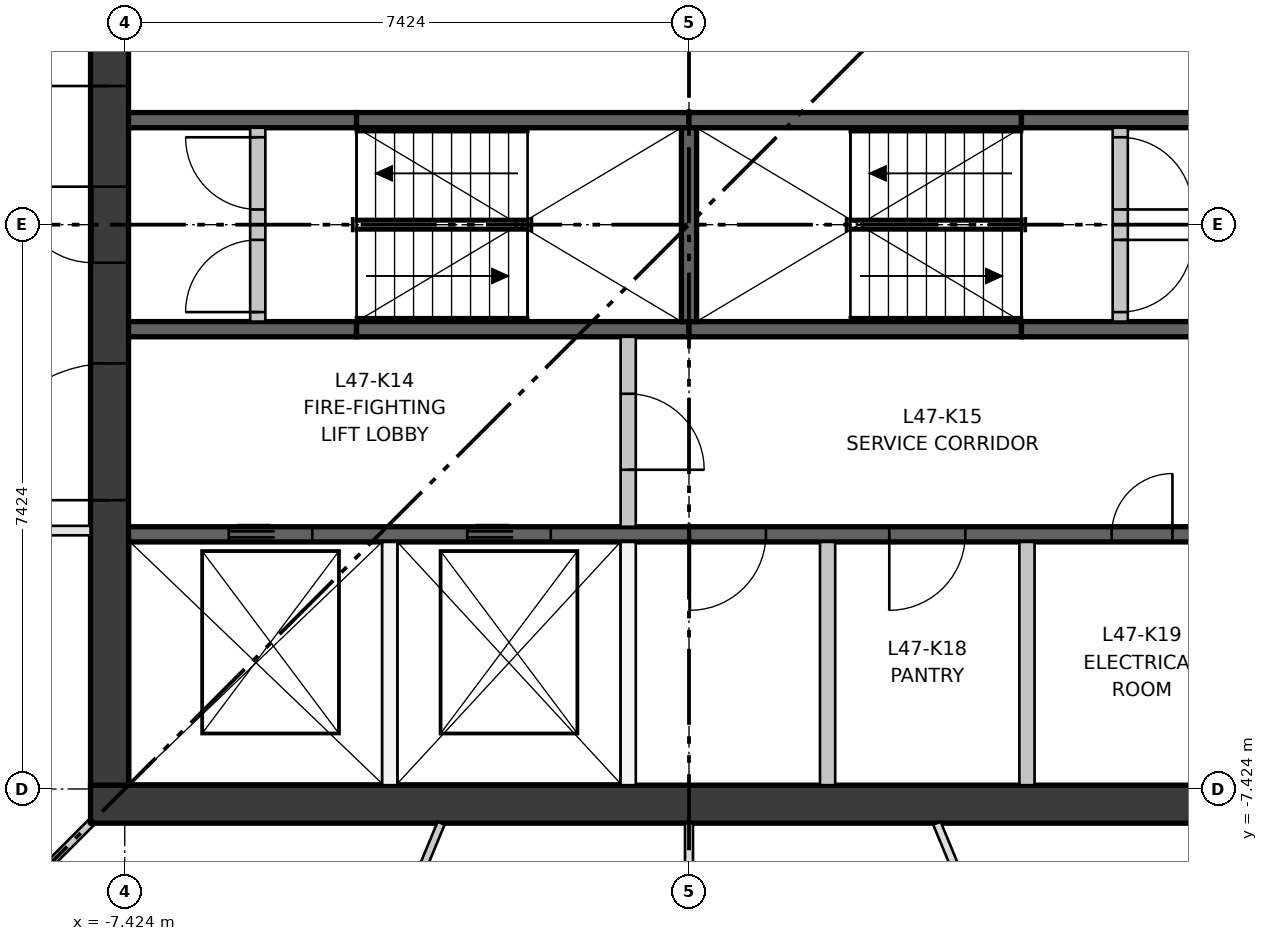
"""IFC4 building model, lengths in metres.
Left out: names, types, materials, properties, quantities, classifications, styles, units other than length and angle.
Written with IfcOpenShell. Run it as: python <this file> out.ifc"""

import sys

from ifc_helpers import new_model, si_unit, direction, frame, frame_2d, origin, place, context, subcontext, project, spatial, rectangle, extrude, element, fill, save


model = new_model("IFC4")
c1 = context("Model", 3, precision=1e-05, world=origin(), true_north=direction((0.0, 1.0)))
c2 = subcontext(c1, "Body", "Model", "MODEL_VIEW")
j1 = project(units=[si_unit("LENGTHUNIT", "METRE"), si_unit("PLANEANGLEUNIT", "RADIAN")], contexts=[c1])
p1 = place(None, origin())
s1 = spatial("IfcSite", under=j1, at=p1, CompositionType="ELEMENT")
p2 = place(p1, origin())
s2 = spatial("IfcBuilding", under=s1, at=p2, CompositionType="ELEMENT")
p3 = place(p2, frame((0.0, 0.0, 177.6)))
s3 = spatial("IfcBuildingStorey", under=s2, at=p3, CompositionType="ELEMENT", Elevation=177.6)
p4 = place(p3, frame((-7.874, -7.624, 0.0), z_axis=(0.0, 0.0, 1.0), x_axis=(1.0, 0.0, 0.0)))
e1 = element("IfcWall", 1, at=p4, inside=s3, PredefinedType="SHEAR", context=c2, shape_type="SweptSolid", body=[
    extrude(rectangle(XDim=15.748, YDim=0.5, at=frame_2d((7.874, 0.0))), origin(), (0.0, 0.0, 1.0), 3.35),
])
p5 = place(p3, frame((-7.624, -7.374, 0.0), z_axis=(0.0, 0.0, 1.0), x_axis=(0.0, 1.0, 0.0)))
e2 = element("IfcWall", 2, at=p5, inside=s3, PredefinedType="SHEAR", context=c2, shape_type="SweptSolid", body=[
    extrude(rectangle(XDim=14.748, YDim=0.5, at=frame_2d((7.374, 0.0))), origin(), (0.0, 0.0, 1.0), 3.35),
])
p6 = place(p5, frame((6.874, 0.0, 0.0)))
e3 = element("IfcOpeningElement", 3, at=p6, cuts=e2, PredefinedType="OPENING", context=c2, shape_type="SweptSolid", body=[
    extrude(rectangle(XDim=1.0, YDim=2.1, at=frame_2d((0.5, 1.05))), frame((0.0, 0.26, 0.0), z_axis=(0.0, -1.0, 0.0), x_axis=(1.0, 0.0, 0.0)), (0.0, 0.0, 1.0), 0.52),
])
p7 = place(p5, frame((3.75, 0.0, 0.0)))
e4 = element("IfcOpeningElement", 4, at=p7, cuts=e2, PredefinedType="OPENING", context=c2, shape_type="SweptSolid", body=[
    extrude(rectangle(XDim=1.8, YDim=2.1, at=frame_2d((0.9, 1.05))), frame((0.0, 0.26, 0.0), z_axis=(0.0, -1.0, 0.0), x_axis=(1.0, 0.0, 0.0)), (0.0, 0.0, 1.0), 0.52),
])
p8 = place(p5, frame((9.198, 0.0, 0.0)))
e5 = element("IfcOpeningElement", 5, at=p8, cuts=e2, PredefinedType="OPENING", context=c2, shape_type="SweptSolid", body=[
    extrude(rectangle(XDim=1.8, YDim=2.1, at=frame_2d((0.9, 1.05))), frame((0.0, 0.26, 0.0), z_axis=(0.0, -1.0, 0.0), x_axis=(1.0, 0.0, 0.0)), (0.0, 0.0, 1.0), 0.52),
])
p9 = place(p3, frame((-7.374, -4.074, 0.0), z_axis=(0.0, 0.0, 1.0), x_axis=(1.0, 0.0, 0.0)))
e6 = element("IfcWall", 6, at=p9, inside=s3, PredefinedType="SHEAR", context=c2, shape_type="SweptSolid", body=[
    extrude(rectangle(XDim=14.748, YDim=0.2, at=frame_2d((7.374, 0.0))), origin(), (0.0, 0.0, 1.0), 3.0),
])
p10 = place(p9, frame((1.319, 0.0, 0.0)))
e7 = element("IfcOpeningElement", 7, at=p10, cuts=e6, PredefinedType="OPENING", context=c2, shape_type="SweptSolid", body=[
    extrude(rectangle(XDim=1.1, YDim=2.1, at=frame_2d((0.55, 1.05))), frame((0.0, 0.11, 0.0), z_axis=(0.0, -1.0, 0.0), x_axis=(1.0, 0.0, 0.0)), (0.0, 0.0, 1.0), 0.22),
])
p11 = place(p9, frame((4.456, 0.0, 0.0)))
e8 = element("IfcOpeningElement", 8, at=p11, cuts=e6, PredefinedType="OPENING", context=c2, shape_type="SweptSolid", body=[
    extrude(rectangle(XDim=1.1, YDim=2.1, at=frame_2d((0.55, 1.05))), frame((0.0, 0.11, 0.0), z_axis=(0.0, -1.0, 0.0), x_axis=(1.0, 0.0, 0.0)), (0.0, 0.0, 1.0), 0.22),
])
p12 = place(p9, frame((7.386, 0.0, 0.0)))
e9 = element("IfcOpeningElement", 9, at=p12, cuts=e6, PredefinedType="OPENING", context=c2, shape_type="SweptSolid", body=[
    extrude(rectangle(XDim=1.0, YDim=2.1, at=frame_2d((0.5, 1.05))), frame((0.0, 0.11, 0.0), z_axis=(0.0, -1.0, 0.0), x_axis=(1.0, 0.0, 0.0)), (0.0, 0.0, 1.0), 0.22),
])
p13 = place(p9, frame((10.009, 0.0, 0.0)))
e10 = element("IfcOpeningElement", 10, at=p13, cuts=e6, PredefinedType="OPENING", context=c2, shape_type="SweptSolid", body=[
    extrude(rectangle(XDim=1.0, YDim=2.1, at=frame_2d((0.5, 1.05))), frame((0.0, 0.11, 0.0), z_axis=(0.0, -1.0, 0.0), x_axis=(1.0, 0.0, 0.0)), (0.0, 0.0, 1.0), 0.22),
])
p14 = place(p9, frame((12.934, 0.0, 0.0)))
e11 = element("IfcOpeningElement", 11, at=p14, cuts=e6, PredefinedType="OPENING", context=c2, shape_type="SweptSolid", body=[
    extrude(rectangle(XDim=0.8, YDim=2.1, at=frame_2d((0.4, 1.05))), frame((0.0, 0.11, 0.0), z_axis=(0.0, -1.0, 0.0), x_axis=(1.0, 0.0, 0.0)), (0.0, 0.0, 1.0), 0.22),
])
p15 = place(p3, frame((-7.374, -1.375, 0.0), z_axis=(0.0, 0.0, 1.0), x_axis=(1.0, 0.0, 0.0)))
e12 = element("IfcWall", 12, at=p15, inside=s3, PredefinedType="SHEAR", context=c2, shape_type="SweptSolid", body=[
    extrude(rectangle(XDim=3.0, YDim=0.2, at=frame_2d((1.5, 0.0))), origin(), (0.0, 0.0, 1.0), 3.0),
])
for number, where, z_axis, x_axis in (
    (13, (-4.374, -1.375, 0.0), (0.0, 0.0, 1.0), (1.0, 0.0, 0.0)),
    (14, (0.0, -1.375, 0.0), (0.0, 0.0, 1.0), (1.0, 0.0, 0.0)),
):
    element("IfcWall", number, at=place(p3, frame(where, z_axis=z_axis, x_axis=x_axis)), inside=s3, PredefinedType="SHEAR", context=c2, shape_type="SweptSolid", body=[
        extrude(rectangle(XDim=4.374, YDim=0.2, at=frame_2d((2.187, 0.0))), origin(), (0.0, 0.0, 1.0), 3.0),
    ])
for number, where, z_axis, x_axis in (
    (15, (4.374, -1.375, 0.0), (0.0, 0.0, 1.0), (1.0, 0.0, 0.0)),
    (16, (-7.374, 1.375, 0.0), (0.0, 0.0, 1.0), (1.0, 0.0, 0.0)),
):
    element("IfcWall", number, at=place(p3, frame(where, z_axis=z_axis, x_axis=x_axis)), inside=s3, PredefinedType="SHEAR", context=c2, shape_type="SweptSolid", body=[
        extrude(rectangle(XDim=3.0, YDim=0.2, at=frame_2d((1.5, 0.0))), origin(), (0.0, 0.0, 1.0), 3.0),
    ])
for number, where, z_axis, x_axis in (
    (17, (-4.374, 1.375, 0.0), (0.0, 0.0, 1.0), (1.0, 0.0, 0.0)),
    (18, (0.0, 1.375, 0.0), (0.0, 0.0, 1.0), (1.0, 0.0, 0.0)),
):
    element("IfcWall", number, at=place(p3, frame(where, z_axis=z_axis, x_axis=x_axis)), inside=s3, PredefinedType="SHEAR", context=c2, shape_type="SweptSolid", body=[
        extrude(rectangle(XDim=4.374, YDim=0.2, at=frame_2d((2.187, 0.0))), origin(), (0.0, 0.0, 1.0), 3.0),
    ])
p16 = place(p3, frame((4.374, 1.375, 0.0), z_axis=(0.0, 0.0, 1.0), x_axis=(1.0, 0.0, 0.0)))
e19 = element("IfcWall", 19, at=p16, inside=s3, PredefinedType="SHEAR", context=c2, shape_type="SweptSolid", body=[
    extrude(rectangle(XDim=3.0, YDim=0.2, at=frame_2d((1.5, 0.0))), origin(), (0.0, 0.0, 1.0), 3.0),
])
p17 = place(p3, frame((0.0, -1.275, 0.0), z_axis=(0.0, 0.0, 1.0), x_axis=(0.0, 1.0, 0.0)))
e20 = element("IfcWall", 20, at=p17, inside=s3, PredefinedType="SHEAR", context=c2, shape_type="SweptSolid", body=[
    extrude(rectangle(XDim=2.55, YDim=0.2, at=frame_2d((1.275, 0.0))), origin(), (0.0, 0.0, 1.0), 3.0),
])
for number, where, z_axis, x_axis in (
    (21, (-3.937, -7.374, 0.0), (0.0, 0.0, 1.0), (0.0, 1.0, 0.0)),
    (22, (-0.8, -7.374, 0.0), (0.0, 0.0, 1.0), (0.0, 1.0, 0.0)),
):
    element("IfcWall", number, at=place(p3, frame(where, z_axis=z_axis, x_axis=x_axis)), inside=s3, PredefinedType="PARTITIONING", context=c2, shape_type="SweptSolid", body=[
        extrude(rectangle(XDim=3.2, YDim=0.2, at=frame_2d((1.6, 0.0))), origin(), (0.0, 0.0, 1.0), 3.0),
    ])
p18 = place(p3, frame((-0.8, -3.974, 0.0), z_axis=(0.0, 0.0, 1.0), x_axis=(0.0, 1.0, 0.0)))
e23 = element("IfcWall", 23, at=p18, inside=s3, PredefinedType="PARTITIONING", context=c2, shape_type="SweptSolid", body=[
    extrude(rectangle(XDim=2.499, YDim=0.2, at=frame_2d((1.25, 0.0))), origin(), (0.0, 0.0, 1.0), 3.0),
])
p19 = place(p18, frame((0.75, 0.0, 0.0)))
e24 = element("IfcOpeningElement", 24, at=p19, cuts=e23, PredefinedType="OPENING", context=c2, shape_type="SweptSolid", body=[
    extrude(rectangle(XDim=1.0, YDim=2.1, at=frame_2d((0.5, 1.05))), frame((0.0, 0.11, 0.0), z_axis=(0.0, -1.0, 0.0), x_axis=(1.0, 0.0, 0.0)), (0.0, 0.0, 1.0), 0.22),
])
for number, where, z_axis, x_axis in (
    (25, (1.823, -7.374, 0.0), (0.0, 0.0, 1.0), (0.0, 1.0, 0.0)),
    (26, (4.447, -7.374, 0.0), (0.0, 0.0, 1.0), (0.0, 1.0, 0.0)),
):
    element("IfcWall", number, at=place(p3, frame(where, z_axis=z_axis, x_axis=x_axis)), inside=s3, PredefinedType="PARTITIONING", context=c2, shape_type="SweptSolid", body=[
        extrude(rectangle(XDim=3.2, YDim=0.2, at=frame_2d((1.6, 0.0))), origin(), (0.0, 0.0, 1.0), 3.0),
    ])
p20 = place(p3, frame((-5.674, -1.275, 0.0), z_axis=(0.0, 0.0, 1.0), x_axis=(0.0, 1.0, 0.0)))
e27 = element("IfcWall", 27, at=p20, inside=s3, PredefinedType="PARTITIONING", context=c2, shape_type="SweptSolid", body=[
    extrude(rectangle(XDim=2.55, YDim=0.2, at=frame_2d((1.275, 0.0))), origin(), (0.0, 0.0, 1.0), 3.0),
])
p21 = place(p20, frame((0.125, 0.0, 0.0)))
e28 = element("IfcOpeningElement", 28, at=p21, cuts=e27, PredefinedType="OPENING", context=c2, shape_type="SweptSolid", body=[
    extrude(rectangle(XDim=0.95, YDim=2.1, at=frame_2d((0.475, 1.05))), frame((0.0, 0.11, 0.0), z_axis=(0.0, -1.0, 0.0), x_axis=(1.0, 0.0, 0.0)), (0.0, 0.0, 1.0), 0.22),
])
p22 = place(p20, frame((1.475, 0.0, 0.0)))
e29 = element("IfcOpeningElement", 29, at=p22, cuts=e27, PredefinedType="OPENING", context=c2, shape_type="SweptSolid", body=[
    extrude(rectangle(XDim=0.95, YDim=2.1, at=frame_2d((0.475, 1.05))), frame((0.0, 0.11, 0.0), z_axis=(0.0, -1.0, 0.0), x_axis=(1.0, 0.0, 0.0)), (0.0, 0.0, 1.0), 0.22),
])
p23 = place(p3, frame((5.674, -1.275, 0.0), z_axis=(0.0, 0.0, 1.0), x_axis=(0.0, 1.0, 0.0)))
e30 = element("IfcWall", 30, at=p23, inside=s3, PredefinedType="PARTITIONING", context=c2, shape_type="SweptSolid", body=[
    extrude(rectangle(XDim=2.55, YDim=0.2, at=frame_2d((1.275, 0.0))), origin(), (0.0, 0.0, 1.0), 3.0),
])
p24 = place(p23, frame((0.125, 0.0, 0.0)))
e31 = element("IfcOpeningElement", 31, at=p24, cuts=e30, PredefinedType="OPENING", context=c2, shape_type="SweptSolid", body=[
    extrude(rectangle(XDim=0.95, YDim=2.1, at=frame_2d((0.475, 1.05))), frame((0.0, 0.11, 0.0), z_axis=(0.0, -1.0, 0.0), x_axis=(1.0, 0.0, 0.0)), (0.0, 0.0, 1.0), 0.22),
])
p25 = place(p23, frame((1.475, 0.0, 0.0)))
e32 = element("IfcOpeningElement", 32, at=p25, cuts=e30, PredefinedType="OPENING", context=c2, shape_type="SweptSolid", body=[
    extrude(rectangle(XDim=0.95, YDim=2.1, at=frame_2d((0.475, 1.05))), frame((0.0, 0.11, 0.0), z_axis=(0.0, -1.0, 0.0), x_axis=(1.0, 0.0, 0.0)), (0.0, 0.0, 1.0), 0.22),
])
p26 = place(p3, frame((-7.874, -4.024, 0.0), z_axis=(0.0, 0.0, 1.0), x_axis=(-1.0, 0.0, 0.0)))
e33 = element("IfcWall", 33, at=p26, inside=s3, PredefinedType="PARTITIONING", context=c2, shape_type="SweptSolid", body=[
    extrude(rectangle(XDim=5.499, YDim=0.125, at=frame_2d((2.75, 0.0))), origin(), (0.0, 0.0, 1.0), 3.0),
])
p27 = place(p26, frame((2.2, 0.0, 0.0)))
e34 = element("IfcOpeningElement", 34, at=p27, cuts=e33, PredefinedType="OPENING", context=c2, shape_type="SweptSolid", body=[
    extrude(rectangle(XDim=1.0, YDim=2.1, at=frame_2d((0.5, 1.05))), frame((0.0, 0.073, 0.0), z_axis=(0.0, -1.0, 0.0), x_axis=(1.0, 0.0, 0.0)), (0.0, 0.0, 1.0), 0.145),
])
p28 = place(p3, frame((-7.874, -7.874, 0.0), z_axis=(0.0, 0.0, 1.0), x_axis=(-0.707106781187, -0.707106781187, 0.0)))
e35 = element("IfcWall", 35, at=p28, inside=s3, PredefinedType="PARTITIONING", context=c2, shape_type="SweptSolid", body=[
    extrude(rectangle(XDim=6.404, YDim=0.1, at=frame_2d((3.202, 0.0))), origin(), (0.0, 0.0, 1.0), 3.0),
])
p29 = place(p28, frame((2.4, 0.0, 0.0)))
e36 = element("IfcOpeningElement", 36, at=p29, cuts=e35, PredefinedType="OPENING", context=c2, shape_type="SweptSolid", body=[
    extrude(rectangle(XDim=1.0, YDim=2.1, at=frame_2d((0.5, 1.05))), frame((0.0, 0.06, 0.0), z_axis=(0.0, -1.0, 0.0), x_axis=(1.0, 0.0, 0.0)), (0.0, 0.0, 1.0), 0.12),
])
p30 = place(p3, frame((-3.261, -7.874, 0.0), z_axis=(0.0, 0.0, 1.0), x_axis=(-0.382669328176, -0.923885374532, 0.0)))
e37 = element("IfcWall", 37, at=p30, inside=s3, PredefinedType="PARTITIONING", context=c2, shape_type="SweptSolid", body=[
    extrude(rectangle(XDim=6.247, YDim=0.1, at=frame_2d((3.124, 0.0))), origin(), (0.0, 0.0, 1.0), 3.0),
])
p31 = place(p30, frame((2.6, 0.0, 0.0)))
e38 = element("IfcOpeningElement", 38, at=p31, cuts=e37, PredefinedType="OPENING", context=c2, shape_type="SweptSolid", body=[
    extrude(rectangle(XDim=1.0, YDim=2.1, at=frame_2d((0.5, 1.05))), frame((0.0, 0.06, 0.0), z_axis=(0.0, -1.0, 0.0), x_axis=(1.0, 0.0, 0.0)), (0.0, 0.0, 1.0), 0.12),
])
p32 = place(p3, frame((0.0, -7.874, 0.0), z_axis=(0.0, 0.0, 1.0), x_axis=(0.0, -1.0, 0.0)))
e39 = element("IfcWall", 39, at=p32, inside=s3, PredefinedType="PARTITIONING", context=c2, shape_type="SweptSolid", body=[
    extrude(rectangle(XDim=6.896, YDim=0.105, at=frame_2d((3.448, 0.0))), origin(), (0.0, 0.0, 1.0), 3.0),
])
p33 = place(p32, frame((2.9, 0.0, 0.0)))
e40 = element("IfcOpeningElement", 40, at=p33, cuts=e39, PredefinedType="OPENING", context=c2, shape_type="SweptSolid", body=[
    extrude(rectangle(XDim=1.0, YDim=2.1, at=frame_2d((0.5, 1.05))), frame((0.0, 0.062, 0.0), z_axis=(0.0, -1.0, 0.0), x_axis=(1.0, 0.0, 0.0)), (0.0, 0.0, 1.0), 0.125),
])
p34 = place(p3, frame((3.261, -7.874, 0.0), z_axis=(0.0, 0.0, 1.0), x_axis=(0.382669328176, -0.923885374532, 0.0)))
e41 = element("IfcWall", 41, at=p34, inside=s3, PredefinedType="PARTITIONING", context=c2, shape_type="SweptSolid", body=[
    extrude(rectangle(XDim=6.247, YDim=0.105, at=frame_2d((3.124, 0.0))), origin(), (0.0, 0.0, 1.0), 3.0),
])
p35 = place(p10, origin())
e42 = element("IfcDoor", 42, at=p35, inside=s3, OperationType="DOUBLE_DOOR_SLIDING", PredefinedType="DOOR", context=c2, shape_type="SweptSolid", body=[
    extrude(rectangle(XDim=1.1, YDim=2.1, at=frame_2d((0.55, 1.05))), frame((0.0, 0.025, 0.0), z_axis=(0.0, -1.0, 0.0), x_axis=(1.0, 0.0, 0.0)), (0.0, 0.0, 1.0), 0.05),
])
fill(e7, e42)
p36 = place(p11, origin())
e43 = element("IfcDoor", 43, at=p36, inside=s3, OperationType="DOUBLE_DOOR_SLIDING", PredefinedType="DOOR", context=c2, shape_type="SweptSolid", body=[
    extrude(rectangle(XDim=1.1, YDim=2.1, at=frame_2d((0.55, 1.05))), frame((0.0, 0.025, 0.0), z_axis=(0.0, -1.0, 0.0), x_axis=(1.0, 0.0, 0.0)), (0.0, 0.0, 1.0), 0.05),
])
fill(e8, e43)
p37 = place(p21, origin())
e44 = element("IfcDoor", 44, at=p37, inside=s3, OperationType="SINGLE_SWING_LEFT", PredefinedType="DOOR", context=c2, shape_type="SweptSolid", body=[
    extrude(rectangle(XDim=0.95, YDim=2.1, at=frame_2d((0.475, 1.05))), frame((0.0, 0.025, 0.0), z_axis=(0.0, -1.0, 0.0), x_axis=(1.0, 0.0, 0.0)), (0.0, 0.0, 1.0), 0.05),
])
fill(e28, e44)
p38 = place(p22, origin())
e45 = element("IfcDoor", 45, at=p38, inside=s3, OperationType="SINGLE_SWING_RIGHT", PredefinedType="DOOR", context=c2, shape_type="SweptSolid", body=[
    extrude(rectangle(XDim=0.95, YDim=2.1, at=frame_2d((0.475, 1.05))), frame((0.0, 0.025, 0.0), z_axis=(0.0, -1.0, 0.0), x_axis=(1.0, 0.0, 0.0)), (0.0, 0.0, 1.0), 0.05),
])
fill(e29, e45)
p39 = place(p24, frame((0.95, 0.0, 0.0), z_axis=(0.0, 0.0, 1.0), x_axis=(-1.0, 0.0, 0.0)))
e46 = element("IfcDoor", 46, at=p39, inside=s3, OperationType="SINGLE_SWING_RIGHT", PredefinedType="DOOR", context=c2, shape_type="SweptSolid", body=[
    extrude(rectangle(XDim=0.95, YDim=2.1, at=frame_2d((0.475, 1.05))), frame((0.0, 0.025, 0.0), z_axis=(0.0, -1.0, 0.0), x_axis=(1.0, 0.0, 0.0)), (0.0, 0.0, 1.0), 0.05),
])
fill(e31, e46)
p40 = place(p25, frame((0.95, 0.0, 0.0), z_axis=(0.0, 0.0, 1.0), x_axis=(-1.0, 0.0, 0.0)))
e47 = element("IfcDoor", 47, at=p40, inside=s3, OperationType="SINGLE_SWING_LEFT", PredefinedType="DOOR", context=c2, shape_type="SweptSolid", body=[
    extrude(rectangle(XDim=0.95, YDim=2.1, at=frame_2d((0.475, 1.05))), frame((0.0, 0.025, 0.0), z_axis=(0.0, -1.0, 0.0), x_axis=(1.0, 0.0, 0.0)), (0.0, 0.0, 1.0), 0.05),
])
fill(e32, e47)
p41 = place(p19, frame((1.0, 0.0, 0.0), z_axis=(0.0, 0.0, 1.0), x_axis=(-1.0, 0.0, 0.0)))
e48 = element("IfcDoor", 48, at=p41, inside=s3, OperationType="SINGLE_SWING_LEFT", PredefinedType="DOOR", context=c2, shape_type="SweptSolid", body=[
    extrude(rectangle(XDim=1.0, YDim=2.1, at=frame_2d((0.5, 1.05))), frame((0.0, 0.025, 0.0), z_axis=(0.0, -1.0, 0.0), x_axis=(1.0, 0.0, 0.0)), (0.0, 0.0, 1.0), 0.05),
])
fill(e24, e48)
p42 = place(p12, frame((1.0, 0.0, 0.0), z_axis=(0.0, 0.0, 1.0), x_axis=(-1.0, 0.0, 0.0)))
e49 = element("IfcDoor", 49, at=p42, inside=s3, OperationType="SINGLE_SWING_LEFT", PredefinedType="DOOR", context=c2, shape_type="SweptSolid", body=[
    extrude(rectangle(XDim=1.0, YDim=2.1, at=frame_2d((0.5, 1.05))), frame((0.0, 0.025, 0.0), z_axis=(0.0, -1.0, 0.0), x_axis=(1.0, 0.0, 0.0)), (0.0, 0.0, 1.0), 0.05),
])
fill(e9, e49)
p43 = place(p13, frame((1.0, 0.0, 0.0), z_axis=(0.0, 0.0, 1.0), x_axis=(-1.0, 0.0, 0.0)))
e50 = element("IfcDoor", 50, at=p43, inside=s3, OperationType="SINGLE_SWING_LEFT", PredefinedType="DOOR", context=c2, shape_type="SweptSolid", body=[
    extrude(rectangle(XDim=1.0, YDim=2.1, at=frame_2d((0.5, 1.05))), frame((0.0, 0.025, 0.0), z_axis=(0.0, -1.0, 0.0), x_axis=(1.0, 0.0, 0.0)), (0.0, 0.0, 1.0), 0.05),
])
fill(e10, e50)
p44 = place(p14, origin())
e51 = element("IfcDoor", 51, at=p44, inside=s3, OperationType="SINGLE_SWING_RIGHT", PredefinedType="DOOR", context=c2, shape_type="SweptSolid", body=[
    extrude(rectangle(XDim=0.8, YDim=2.1, at=frame_2d((0.4, 1.05))), frame((0.0, 0.025, 0.0), z_axis=(0.0, -1.0, 0.0), x_axis=(1.0, 0.0, 0.0)), (0.0, 0.0, 1.0), 0.05),
])
fill(e11, e51)
p45 = place(p6, origin())
e52 = element("IfcDoor", 52, at=p45, inside=s3, OperationType="SINGLE_SWING_RIGHT", PredefinedType="DOOR", context=c2, shape_type="SweptSolid", body=[
    extrude(rectangle(XDim=1.0, YDim=2.1, at=frame_2d((0.5, 1.05))), frame((0.0, 0.25, 0.0), z_axis=(0.0, -1.0, 0.0), x_axis=(1.0, 0.0, 0.0)), (0.0, 0.0, 1.0), 0.05),
])
fill(e3, e52)
p46 = place(p7, origin())
e53 = element("IfcDoor", 53, at=p46, inside=s3, OperationType="DOUBLE_DOOR_SINGLE_SWING", PredefinedType="DOOR", context=c2, shape_type="SweptSolid", body=[
    extrude(rectangle(XDim=1.8, YDim=2.1, at=frame_2d((0.9, 1.05))), frame((0.0, 0.025, 0.0), z_axis=(0.0, -1.0, 0.0), x_axis=(1.0, 0.0, 0.0)), (0.0, 0.0, 1.0), 0.05),
])
fill(e4, e53)
p47 = place(p8, origin())
e54 = element("IfcDoor", 54, at=p47, inside=s3, OperationType="DOUBLE_DOOR_SINGLE_SWING", PredefinedType="DOOR", context=c2, shape_type="SweptSolid", body=[
    extrude(rectangle(XDim=1.8, YDim=2.1, at=frame_2d((0.9, 1.05))), frame((0.0, 0.025, 0.0), z_axis=(0.0, -1.0, 0.0), x_axis=(1.0, 0.0, 0.0)), (0.0, 0.0, 1.0), 0.05),
])
fill(e5, e54)
save(model, sys.argv[1])
